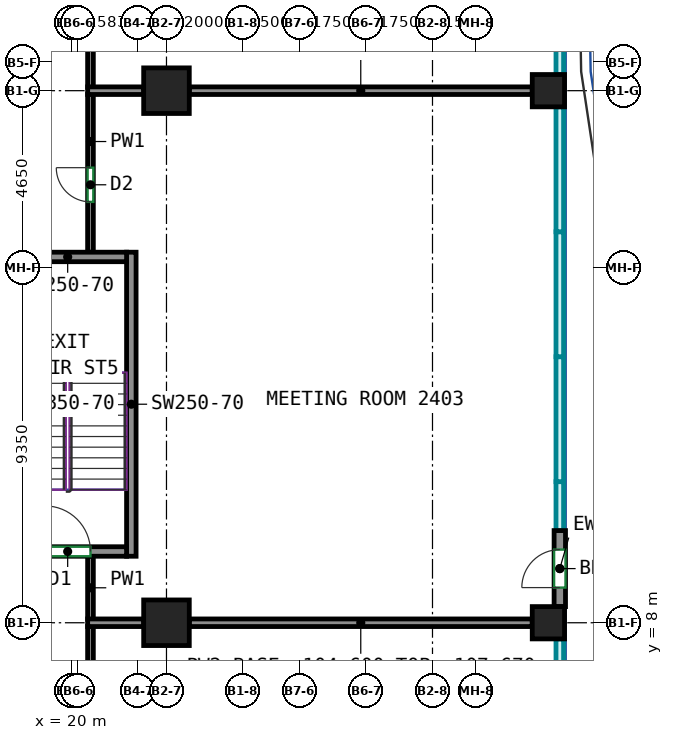
"""IFC4 building model, lengths in metres.
Left out: names, types, materials, properties, quantities, classifications, styles, units other than length and angle.
Written with IfcOpenShell. Run it as: python <this file> out.ifc"""

import sys

from ifc_helpers import new_model, si_unit, direction, frame, frame_2d, origin, origin_2d, place, context, subcontext, project, spatial, rectangle, extrude, source, transform, mapped, element, fill, save


model = new_model("IFC4")
c1 = context("Model", 3, precision=1e-05, world=origin(), true_north=direction((0.0, 1.0)))
c2 = subcontext(c1, "Body", "Model", "MODEL_VIEW")
j1 = project(units=[si_unit("LENGTHUNIT", "METRE"), si_unit("PLANEANGLEUNIT", "RADIAN")], contexts=[c1])
p1 = place(None, origin())
s1 = spatial("IfcSite", under=j1, at=p1, CompositionType="ELEMENT")
p2 = place(p1, origin())
s2 = spatial("IfcBuilding", under=s1, at=p2, CompositionType="ELEMENT")
p3 = place(p2, frame((0.0, 0.0, 104.6)))
s3 = spatial("IfcBuildingStorey", under=s2, at=p3, CompositionType="ELEMENT", Elevation=104.6)
m1 = source(origin(), c2, "Body", "SweptSolid", [
    extrude(rectangle(XDim=1.2, YDim=1.2, at=origin_2d()), origin(), (0.0, 0.0, 1.0), 3.72),
])
for number, where, z_axis, x_axis in (
    (1, (22.5, 8.0, 0.0), (0.0, 0.0, 1.0), (1.0, 0.0, 0.0)),
    (2, (22.5, 22.0, 0.0), (0.0, 0.0, 1.0), (1.0, 0.0, 0.0)),
):
    element("IfcColumn", number, at=place(p3, frame(where, z_axis=z_axis, x_axis=x_axis)), inside=s3, PredefinedType="COLUMN", context=c2, shape_type="MappedRepresentation", body=[
        mapped(m1, transform((0.0, 0.0, 0.0))),
    ])
m2 = source(origin(), c2, "Body", "SweptSolid", [
    extrude(rectangle(XDim=0.85, YDim=0.85, at=origin_2d()), origin(), (0.0, 0.0, 1.0), 3.72),
])
for number, where, z_axis, x_axis in (
    (3, (32.55, 8.0, 0.0), (0.0, 0.0, 1.0), (1.0, 0.0, 0.0)),
    (4, (32.55, 22.0, 0.0), (0.0, 0.0, 1.0), (1.0, 0.0, 0.0)),
):
    element("IfcColumn", number, at=place(p3, frame(where, z_axis=z_axis, x_axis=x_axis)), inside=s3, PredefinedType="COLUMN", context=c2, shape_type="MappedRepresentation", body=[
        mapped(m2, transform((0.0, 0.0, 0.0))),
    ])
m3 = source(origin(), c2, "Body", "SweptSolid", [
    extrude(rectangle(XDim=8.0, YDim=0.25, at=frame_2d((4.0, 0.0))), origin(), (0.0, 0.0, 1.0), 3.72),
])
p4 = place(p3, frame((21.575, 9.75, 0.0), z_axis=(0.0, 0.0, 1.0), x_axis=(0.0, 1.0, 0.0)))
e5 = element("IfcWall", 5, at=p4, inside=s3, PredefinedType="SHEAR", context=c2, shape_type="MappedRepresentation", body=[
    mapped(m3, transform((0.0, 0.0, 0.0))),
])
m4 = source(origin(), c2, "Body", "SweptSolid", [
    extrude(rectangle(XDim=3.1, YDim=0.25, at=frame_2d((1.55, 0.0))), origin(), (0.0, 0.0, 1.0), 3.72),
])
p5 = place(p3, frame((18.35, 9.875, 0.0), z_axis=(0.0, 0.0, 1.0), x_axis=(1.0, 0.0, 0.0)))
e6 = element("IfcWall", 6, at=p5, inside=s3, PredefinedType="SHEAR", context=c2, shape_type="MappedRepresentation", body=[
    mapped(m4, transform((0.0, 0.0, 0.0))),
])
p6 = place(p5, frame((0.95, 0.0, 0.0)))
e7 = element("IfcOpeningElement", 7, at=p6, cuts=e6, PredefinedType="OPENING", context=c2, shape_type="SweptSolid", body=[
    extrude(rectangle(XDim=1.2, YDim=2.1, at=frame_2d((0.6, 1.05))), frame((0.0, 0.135, 0.0), z_axis=(0.0, -1.0, 0.0), x_axis=(1.0, 0.0, 0.0)), (0.0, 0.0, 1.0), 0.27),
])
p7 = place(p3, frame((18.35, 17.625, 0.0), z_axis=(0.0, 0.0, 1.0), x_axis=(1.0, 0.0, 0.0)))
e8 = element("IfcWall", 8, at=p7, inside=s3, PredefinedType="SHEAR", context=c2, shape_type="MappedRepresentation", body=[
    mapped(m4, transform((0.0, 0.0, 0.0))),
])
m5 = source(origin(), c2, "Body", "SweptSolid", [
    extrude(rectangle(XDim=2.0, YDim=0.3, at=frame_2d((1.0, 0.0))), origin(), (0.0, 0.0, 1.0), 3.72),
])
p8 = place(p3, frame((32.85, 8.425, 0.0), z_axis=(0.0, 0.0, 1.0), x_axis=(0.0, 1.0, 0.0)))
e9 = element("IfcWall", 9, at=p8, inside=s3, PredefinedType="SOLIDWALL", context=c2, shape_type="MappedRepresentation", body=[
    mapped(m5, transform((0.0, 0.0, 0.0))),
])
p9 = place(p8, frame((0.5, 0.0, 0.0)))
e10 = element("IfcOpeningElement", 10, at=p9, cuts=e9, PredefinedType="OPENING", context=c2, shape_type="SweptSolid", body=[
    extrude(rectangle(XDim=1.0, YDim=2.1, at=frame_2d((0.5, 1.05))), frame((0.0, 0.16, 0.0), z_axis=(0.0, -1.0, 0.0), x_axis=(1.0, 0.0, 0.0)), (0.0, 0.0, 1.0), 0.32),
])
p10 = place(p3, frame((20.5, 4.35, 0.0), z_axis=(0.0, 0.0, 1.0), x_axis=(0.0, 1.0, 0.0)))
e11 = element("IfcWall", 11, at=p10, inside=s3, PredefinedType="PARTITIONING", context=c2, shape_type="SweptSolid", body=[
    extrude(rectangle(XDim=3.56, YDim=0.15, at=frame_2d((1.78, 0.0))), origin(), (0.0, 0.0, 1.0), 3.72),
])
p11 = place(p3, frame((20.5, 17.75, 0.0), z_axis=(0.0, 0.0, 1.0), x_axis=(0.0, 1.0, 0.0)))
e12 = element("IfcWall", 12, at=p11, inside=s3, PredefinedType="PARTITIONING", context=c2, shape_type="SweptSolid", body=[
    extrude(rectangle(XDim=4.16, YDim=0.15, at=frame_2d((2.08, 0.0))), origin(), (0.0, 0.0, 1.0), 3.72),
])
p12 = place(p11, frame((1.324, 0.0, 0.0)))
e13 = element("IfcOpeningElement", 13, at=p12, cuts=e12, PredefinedType="OPENING", context=c2, shape_type="SweptSolid", body=[
    extrude(rectangle(XDim=0.9, YDim=2.1, at=frame_2d((0.45, 1.05))), frame((0.0, 0.085, 0.0), z_axis=(0.0, -1.0, 0.0), x_axis=(1.0, 0.0, 0.0)), (0.0, 0.0, 1.0), 0.17),
])
p13 = place(p3, frame((20.5, 8.09, 0.0), z_axis=(0.0, 0.0, 1.0), x_axis=(0.0, 1.0, 0.0)))
e14 = element("IfcWall", 14, at=p13, inside=s3, PredefinedType="PARTITIONING", context=c2, shape_type="SweptSolid", body=[
    extrude(rectangle(XDim=1.66, YDim=0.15, at=frame_2d((0.83, 0.0))), origin(), (0.0, 0.0, 1.0), 3.72),
])
p14 = place(p3, frame((20.5, 22.09, 0.0), z_axis=(0.0, 0.0, 1.0), x_axis=(0.0, 1.0, 0.0)))
e15 = element("IfcWall", 15, at=p14, inside=s3, PredefinedType="PARTITIONING", context=c2, shape_type="SweptSolid", body=[
    extrude(rectangle(XDim=2.235, YDim=0.15, at=frame_2d((1.117, 0.0))), origin(), (0.0, 0.0, 1.0), 3.72),
])
p15 = place(p3, frame((20.426, 8.0, 0.0), z_axis=(0.0, 0.0, 1.0), x_axis=(1.0, 0.0, 0.0)))
e16 = element("IfcWall", 16, at=p15, inside=s3, PredefinedType="PARTITIONING", context=c2, shape_type="SweptSolid", body=[
    extrude(rectangle(XDim=1.474, YDim=0.2, at=frame_2d((0.737, 0.0))), origin(), (0.0, 0.0, 1.0), 3.72),
])
for number, where, z_axis, x_axis in (
    (17, (23.1, 8.0, 0.0), (0.0, 0.0, 1.0), (1.0, 0.0, 0.0)),
    (18, (23.1, 22.0, 0.0), (0.0, 0.0, 1.0), (1.0, 0.0, 0.0)),
):
    element("IfcWall", number, at=place(p3, frame(where, z_axis=z_axis, x_axis=x_axis)), inside=s3, PredefinedType="PARTITIONING", context=c2, shape_type="SweptSolid", body=[
        extrude(rectangle(XDim=9.025, YDim=0.2, at=frame_2d((4.512, 0.0))), origin(), (0.0, 0.0, 1.0), 3.07),
    ])
p16 = place(p3, frame((20.426, 22.0, 0.0), z_axis=(0.0, 0.0, 1.0), x_axis=(1.0, 0.0, 0.0)))
e19 = element("IfcWall", 19, at=p16, inside=s3, PredefinedType="PARTITIONING", context=c2, shape_type="SweptSolid", body=[
    extrude(rectangle(XDim=1.474, YDim=0.2, at=frame_2d((0.737, 0.0))), origin(), (0.0, 0.0, 1.0), 3.72),
])
p17 = place(p9, origin())
e20 = element("IfcDoor", 20, at=p17, inside=s3, OperationType="SINGLE_SWING_LEFT", PredefinedType="DOOR", context=c2, shape_type="SweptSolid", body=[
    extrude(rectangle(XDim=1.0, YDim=2.1, at=frame_2d((0.5, 1.05))), frame((0.0, 0.025, 0.0), z_axis=(0.0, -1.0, 0.0), x_axis=(1.0, 0.0, 0.0)), (0.0, 0.0, 1.0), 0.05),
])
fill(e10, e20)
p18 = place(p6, origin())
e21 = element("IfcDoor", 21, at=p18, inside=s3, OperationType="DOUBLE_DOOR_SINGLE_SWING", PredefinedType="DOOR", context=c2, shape_type="SweptSolid", body=[
    extrude(rectangle(XDim=1.2, YDim=2.1, at=frame_2d((0.6, 1.05))), frame((0.0, 0.025, 0.0), z_axis=(0.0, -1.0, 0.0), x_axis=(1.0, 0.0, 0.0)), (0.0, 0.0, 1.0), 0.05),
])
fill(e7, e21)
p19 = place(p12, origin())
e22 = element("IfcDoor", 22, at=p19, inside=s3, OperationType="SINGLE_SWING_RIGHT", PredefinedType="DOOR", context=c2, shape_type="SweptSolid", body=[
    extrude(rectangle(XDim=0.9, YDim=2.1, at=frame_2d((0.45, 1.05))), frame((0.0, 0.025, 0.0), z_axis=(0.0, -1.0, 0.0), x_axis=(1.0, 0.0, 0.0)), (0.0, 0.0, 1.0), 0.05),
])
fill(e13, e22)
save(model, sys.argv[1])
